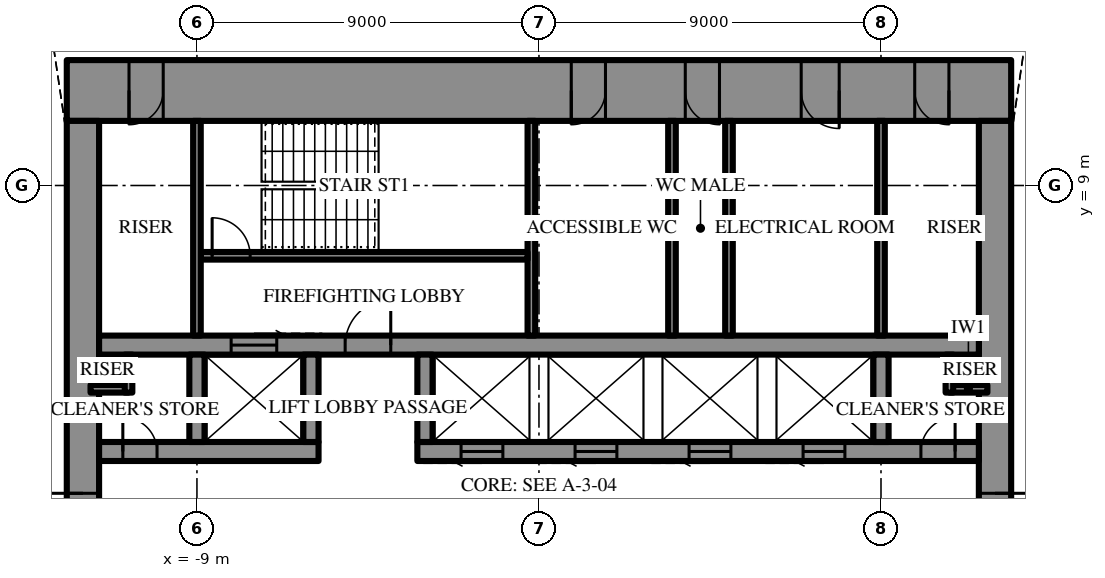
"""IFC4 building model, lengths in metres.
Left out: names, types, materials, properties, quantities, classifications, styles, units other than length and angle.
Written with IfcOpenShell. Run it as: python <this file> out.ifc"""

import sys

from ifc_helpers import new_model, si_unit, direction, frame, frame_2d, origin, place, context, subcontext, project, spatial, rectangle, extrude, element, fill, save


model = new_model("IFC4")
c1 = context("Model", 3, precision=1e-05, world=origin(), true_north=direction((0.0, 1.0)))
c2 = subcontext(c1, "Body", "Model", "MODEL_VIEW")
j1 = project(units=[si_unit("LENGTHUNIT", "METRE"), si_unit("PLANEANGLEUNIT", "RADIAN")], contexts=[c1])
p1 = place(None, origin())
s1 = spatial("IfcSite", under=j1, at=p1, CompositionType="ELEMENT")
p2 = place(p1, origin())
s2 = spatial("IfcBuilding", under=s1, at=p2, CompositionType="ELEMENT")
p3 = place(p2, frame((0.0, 0.0, 328.3)))
s3 = spatial("IfcBuildingStorey", under=s2, at=p3, CompositionType="ELEMENT", Elevation=328.3)
p4 = place(p3, frame((-12.425, 11.5, 0.0), z_axis=(0.0, 0.0, 1.0), x_axis=(1.0, 0.0, 0.0)))
e1 = element("IfcWall", 1, at=p4, inside=s3, PredefinedType="SHEAR", context=c2, shape_type="SweptSolid", body=[
    extrude(rectangle(XDim=24.85, YDim=1.6, at=frame_2d((12.425, 0.0))), origin(), (0.0, 0.0, 1.0), 4.2),
])
p5 = place(p4, frame((13.275, 0.0, 0.0)))
e2 = element("IfcOpeningElement", 2, at=p5, cuts=e1, PredefinedType="OPENING", context=c2, shape_type="SweptSolid", body=[
    extrude(rectangle(XDim=0.9, YDim=2.2, at=frame_2d((0.45, 1.1))), frame((0.0, 0.81, 0.0), z_axis=(0.0, -1.0, 0.0), x_axis=(1.0, 0.0, 0.0)), (0.0, 0.0, 1.0), 1.62),
])
p6 = place(p4, frame((16.275, 0.0, 0.0)))
e3 = element("IfcOpeningElement", 3, at=p6, cuts=e1, PredefinedType="OPENING", context=c2, shape_type="SweptSolid", body=[
    extrude(rectangle(XDim=0.9, YDim=2.2, at=frame_2d((0.45, 1.1))), frame((0.0, 0.81, 0.0), z_axis=(0.0, -1.0, 0.0), x_axis=(1.0, 0.0, 0.0)), (0.0, 0.0, 1.0), 1.62),
])
p7 = place(p4, frame((19.325, 0.0, 0.0)))
e4 = element("IfcOpeningElement", 4, at=p7, cuts=e1, PredefinedType="OPENING", context=c2, shape_type="SweptSolid", body=[
    extrude(rectangle(XDim=1.0, YDim=2.2, at=frame_2d((0.5, 1.1))), frame((0.0, 0.81, 0.0), z_axis=(0.0, -1.0, 0.0), x_axis=(1.0, 0.0, 0.0)), (0.0, 0.0, 1.0), 1.62),
])
p8 = place(p4, frame((1.637, 0.0, 0.0)))
e5 = element("IfcOpeningElement", 5, at=p8, cuts=e1, PredefinedType="OPENING", context=c2, shape_type="SweptSolid", body=[
    extrude(rectangle(XDim=0.9, YDim=2.2, at=frame_2d((0.45, 1.1))), frame((0.0, 0.81, 0.0), z_axis=(0.0, -1.0, 0.0), x_axis=(1.0, 0.0, 0.0)), (0.0, 0.0, 1.0), 1.62),
])
p9 = place(p4, frame((22.312, 0.0, 0.0)))
e6 = element("IfcOpeningElement", 6, at=p9, cuts=e1, PredefinedType="OPENING", context=c2, shape_type="SweptSolid", body=[
    extrude(rectangle(XDim=0.9, YDim=2.2, at=frame_2d((0.45, 1.1))), frame((0.0, 0.81, 0.0), z_axis=(0.0, -1.0, 0.0), x_axis=(1.0, 0.0, 0.0)), (0.0, 0.0, 1.0), 1.62),
])
p10 = place(p3, frame((12.0, -10.7, 0.0), z_axis=(0.0, 0.0, 1.0), x_axis=(0.0, 1.0, 0.0)))
e7 = element("IfcWall", 7, at=p10, inside=s3, PredefinedType="SHEAR", context=c2, shape_type="SweptSolid", body=[
    extrude(rectangle(XDim=21.4, YDim=0.85, at=frame_2d((10.7, 0.0))), origin(), (0.0, 0.0, 1.0), 4.2),
])
p11 = place(p10, frame((9.8, 0.0, 0.0)))
e8 = element("IfcOpeningElement", 8, at=p11, cuts=e7, PredefinedType="OPENING", context=c2, shape_type="SweptSolid", body=[
    extrude(rectangle(XDim=1.8, YDim=2.4, at=frame_2d((0.9, 1.2))), frame((0.0, 0.435, 0.0), z_axis=(0.0, -1.0, 0.0), x_axis=(1.0, 0.0, 0.0)), (0.0, 0.0, 1.0), 0.87),
])
p12 = place(p3, frame((-12.0, 10.7, 0.0), z_axis=(0.0, 0.0, 1.0), x_axis=(0.0, -1.0, 0.0)))
e9 = element("IfcWall", 9, at=p12, inside=s3, PredefinedType="SHEAR", context=c2, shape_type="SweptSolid", body=[
    extrude(rectangle(XDim=21.4, YDim=0.85, at=frame_2d((10.7, 0.0))), origin(), (0.0, 0.0, 1.0), 4.2),
])
p13 = place(p12, frame((9.8, 0.0, 0.0)))
e10 = element("IfcOpeningElement", 10, at=p13, cuts=e9, PredefinedType="OPENING", context=c2, shape_type="SweptSolid", body=[
    extrude(rectangle(XDim=1.8, YDim=2.4, at=frame_2d((0.9, 1.2))), frame((0.0, 0.435, 0.0), z_axis=(0.0, -1.0, 0.0), x_axis=(1.0, 0.0, 0.0)), (0.0, 0.0, 1.0), 0.87),
])
p14 = place(p3, frame((-11.575, 2.0, 0.0), z_axis=(0.0, 0.0, 1.0), x_axis=(1.0, 0.0, 0.0)))
e11 = element("IfcWall", 11, at=p14, inside=s3, PredefinedType="SHEAR", context=c2, shape_type="SweptSolid", body=[
    extrude(rectangle(XDim=5.775, YDim=0.5, at=frame_2d((2.887, 0.0))), origin(), (0.0, 0.0, 1.0), 4.2),
])
p15 = place(p14, frame((0.625, 0.0, 0.0)))
e12 = element("IfcOpeningElement", 12, at=p15, cuts=e11, PredefinedType="OPENING", context=c2, shape_type="SweptSolid", body=[
    extrude(rectangle(XDim=0.9, YDim=2.2, at=frame_2d((0.45, 1.1))), frame((0.0, 0.26, 0.0), z_axis=(0.0, -1.0, 0.0), x_axis=(1.0, 0.0, 0.0)), (0.0, 0.0, 1.0), 0.52),
])
p16 = place(p3, frame((-3.2, 2.0, 0.0), z_axis=(0.0, 0.0, 1.0), x_axis=(1.0, 0.0, 0.0)))
e13 = element("IfcWall", 13, at=p16, inside=s3, PredefinedType="SHEAR", context=c2, shape_type="SweptSolid", body=[
    extrude(rectangle(XDim=14.775, YDim=0.5, at=frame_2d((7.387, 0.0))), origin(), (0.0, 0.0, 1.0), 4.2),
])
p17 = place(p16, frame((13.25, 0.0, 0.0)))
e14 = element("IfcOpeningElement", 14, at=p17, cuts=e13, PredefinedType="OPENING", context=c2, shape_type="SweptSolid", body=[
    extrude(rectangle(XDim=0.9, YDim=2.2, at=frame_2d((0.45, 1.1))), frame((0.0, 0.26, 0.0), z_axis=(0.0, -1.0, 0.0), x_axis=(1.0, 0.0, 0.0)), (0.0, 0.0, 1.0), 0.52),
])
p18 = place(p16, frame((1.15, 0.0, 0.0)))
e15 = element("IfcOpeningElement", 15, at=p18, cuts=e13, PredefinedType="OPENING", context=c2, shape_type="SweptSolid", body=[
    extrude(rectangle(XDim=1.1, YDim=2.2, at=frame_2d((0.55, 1.1))), frame((0.0, 0.26, 0.0), z_axis=(0.0, -1.0, 0.0), x_axis=(1.0, 0.0, 0.0)), (0.0, 0.0, 1.0), 0.52),
])
p19 = place(p16, frame((4.15, 0.0, 0.0)))
e16 = element("IfcOpeningElement", 16, at=p19, cuts=e13, PredefinedType="OPENING", context=c2, shape_type="SweptSolid", body=[
    extrude(rectangle(XDim=1.1, YDim=2.2, at=frame_2d((0.55, 1.1))), frame((0.0, 0.26, 0.0), z_axis=(0.0, -1.0, 0.0), x_axis=(1.0, 0.0, 0.0)), (0.0, 0.0, 1.0), 0.52),
])
p20 = place(p16, frame((7.15, 0.0, 0.0)))
e17 = element("IfcOpeningElement", 17, at=p20, cuts=e13, PredefinedType="OPENING", context=c2, shape_type="SweptSolid", body=[
    extrude(rectangle(XDim=1.1, YDim=2.2, at=frame_2d((0.55, 1.1))), frame((0.0, 0.26, 0.0), z_axis=(0.0, -1.0, 0.0), x_axis=(1.0, 0.0, 0.0)), (0.0, 0.0, 1.0), 0.52),
])
p21 = place(p16, frame((10.15, 0.0, 0.0)))
e18 = element("IfcOpeningElement", 18, at=p21, cuts=e13, PredefinedType="OPENING", context=c2, shape_type="SweptSolid", body=[
    extrude(rectangle(XDim=1.1, YDim=2.2, at=frame_2d((0.55, 1.1))), frame((0.0, 0.26, 0.0), z_axis=(0.0, -1.0, 0.0), x_axis=(1.0, 0.0, 0.0)), (0.0, 0.0, 1.0), 0.52),
])
p22 = place(p3, frame((-11.575, 4.8, 0.0), z_axis=(0.0, 0.0, 1.0), x_axis=(1.0, 0.0, 0.0)))
e19 = element("IfcWall", 19, at=p22, inside=s3, PredefinedType="SHEAR", context=c2, shape_type="SweptSolid", body=[
    extrude(rectangle(XDim=23.15, YDim=0.5, at=frame_2d((11.575, 0.0))), origin(), (0.0, 0.0, 1.0), 4.2),
])
p23 = place(p22, frame((6.475, 0.0, 0.0)))
e20 = element("IfcOpeningElement", 20, at=p23, cuts=e19, PredefinedType="OPENING", context=c2, shape_type="SweptSolid", body=[
    extrude(rectangle(XDim=1.2, YDim=2.2, at=frame_2d((0.6, 1.1))), frame((0.0, 0.26, 0.0), z_axis=(0.0, -1.0, 0.0), x_axis=(1.0, 0.0, 0.0)), (0.0, 0.0, 1.0), 0.52),
])
p24 = place(p22, frame((3.475, 0.0, 0.0)))
e21 = element("IfcOpeningElement", 21, at=p24, cuts=e19, PredefinedType="OPENING", context=c2, shape_type="SweptSolid", body=[
    extrude(rectangle(XDim=1.2, YDim=2.2, at=frame_2d((0.6, 1.1))), frame((0.0, 0.26, 0.0), z_axis=(0.0, -1.0, 0.0), x_axis=(1.0, 0.0, 0.0)), (0.0, 0.0, 1.0), 0.52),
])
for number, where, z_axis, x_axis in (
    (22, (-9.0, 2.25, 0.0), (0.0, 0.0, 1.0), (0.0, 1.0, 0.0)),
    (23, (-6.0, 2.25, 0.0), (0.0, 0.0, 1.0), (0.0, 1.0, 0.0)),
    (24, (-3.0, 2.25, 0.0), (0.0, 0.0, 1.0), (0.0, 1.0, 0.0)),
    (25, (9.0, 2.25, 0.0), (0.0, 0.0, 1.0), (0.0, 1.0, 0.0)),
):
    element("IfcWall", number, at=place(p3, frame(where, z_axis=z_axis, x_axis=x_axis)), inside=s3, PredefinedType="SHEAR", context=c2, shape_type="SweptSolid", body=[
        extrude(rectangle(XDim=2.3, YDim=0.4, at=frame_2d((1.15, 0.0))), origin(), (0.0, 0.0, 1.0), 4.2),
    ])
p25 = place(p3, frame((-0.2, 5.05, 0.0), z_axis=(0.0, 0.0, 1.0), x_axis=(0.0, 1.0, 0.0)))
e26 = element("IfcWall", 26, at=p25, inside=s3, PredefinedType="SHEAR", context=c2, shape_type="SweptSolid", body=[
    extrude(rectangle(XDim=5.65, YDim=0.2, at=frame_2d((2.825, 0.0))), origin(), (0.0, 0.0, 1.0), 4.2),
])
p26 = place(p3, frame((-8.9, 7.15, 0.0), z_axis=(0.0, 0.0, 1.0), x_axis=(1.0, 0.0, 0.0)))
e27 = element("IfcWall", 27, at=p26, inside=s3, PredefinedType="SHEAR", context=c2, shape_type="SweptSolid", body=[
    extrude(rectangle(XDim=8.6, YDim=0.2, at=frame_2d((4.3, 0.0))), origin(), (0.0, 0.0, 1.0), 4.2),
])
p27 = place(p26, frame((0.3, 0.0, 0.0)))
e28 = element("IfcOpeningElement", 28, at=p27, cuts=e27, PredefinedType="OPENING", context=c2, shape_type="SweptSolid", body=[
    extrude(rectangle(XDim=1.0, YDim=2.2, at=frame_2d((0.5, 1.1))), frame((0.0, 0.11, 0.0), z_axis=(0.0, -1.0, 0.0), x_axis=(1.0, 0.0, 0.0)), (0.0, 0.0, 1.0), 0.22),
])
for number, where, z_axis, x_axis in (
    (29, (-9.0, 5.05, 0.0), (0.0, 0.0, 1.0), (0.0, 1.0, 0.0)),
    (30, (9.0, 5.05, 0.0), (0.0, 0.0, 1.0), (0.0, 1.0, 0.0)),
    (31, (3.5, 5.05, 0.0), (0.0, 0.0, 1.0), (0.0, 1.0, 0.0)),
    (32, (5.0, 5.05, 0.0), (0.0, 0.0, 1.0), (0.0, 1.0, 0.0)),
):
    element("IfcWall", number, at=place(p3, frame(where, z_axis=z_axis, x_axis=x_axis)), inside=s3, PredefinedType="PARTITIONING", context=c2, shape_type="SweptSolid", body=[
        extrude(rectangle(XDim=5.65, YDim=0.2, at=frame_2d((2.825, 0.0))), origin(), (0.0, 0.0, 1.0), 4.0),
    ])
for number, where, z_axis, x_axis in (
    (33, (-11.8, 3.65, 0.0), (0.0, 0.0, 1.0), (1.0, 0.0, 0.0)),
    (34, (-10.8, 3.55, 0.0), (0.0, 0.0, 1.0), (0.0, 1.0, 0.0)),
    (35, (10.8, 3.65, 0.0), (0.0, 0.0, 1.0), (1.0, 0.0, 0.0)),
    (36, (10.8, 3.55, 0.0), (0.0, 0.0, 1.0), (0.0, 1.0, 0.0)),
):
    element("IfcWall", number, at=place(p3, frame(where, z_axis=z_axis, x_axis=x_axis)), inside=s3, PredefinedType="PARTITIONING", context=c2, shape_type="SweptSolid", body=[
        extrude(rectangle(XDim=1.0, YDim=0.2, at=frame_2d((0.5, 0.0))), origin(), (0.0, 0.0, 1.0), 4.0),
    ])
p28 = place(p11, frame((1.8, 0.0, 0.0), z_axis=(0.0, 0.0, 1.0), x_axis=(-1.0, 0.0, 0.0)))
e37 = element("IfcDoor", 37, at=p28, inside=s3, OperationType="DOUBLE_DOOR_SINGLE_SWING", PredefinedType="DOOR", context=c2, shape_type="SweptSolid", body=[
    extrude(rectangle(XDim=1.8, YDim=2.4, at=frame_2d((0.9, 1.2))), frame((0.0, 0.025, 0.0), z_axis=(0.0, -1.0, 0.0), x_axis=(1.0, 0.0, 0.0)), (0.0, 0.0, 1.0), 0.05),
])
fill(e8, e37)
p29 = place(p13, frame((1.8, 0.0, 0.0), z_axis=(0.0, 0.0, 1.0), x_axis=(-1.0, 0.0, 0.0)))
e38 = element("IfcDoor", 38, at=p29, inside=s3, OperationType="DOUBLE_DOOR_SINGLE_SWING", PredefinedType="DOOR", context=c2, shape_type="SweptSolid", body=[
    extrude(rectangle(XDim=1.8, YDim=2.4, at=frame_2d((0.9, 1.2))), frame((0.0, 0.025, 0.0), z_axis=(0.0, -1.0, 0.0), x_axis=(1.0, 0.0, 0.0)), (0.0, 0.0, 1.0), 0.05),
])
fill(e10, e38)
p30 = place(p23, origin())
e39 = element("IfcDoor", 39, at=p30, inside=s3, OperationType="SINGLE_SWING_LEFT", PredefinedType="DOOR", context=c2, shape_type="SweptSolid", body=[
    extrude(rectangle(XDim=1.2, YDim=2.2, at=frame_2d((0.6, 1.1))), frame((0.0, 0.025, 0.0), z_axis=(0.0, -1.0, 0.0), x_axis=(1.0, 0.0, 0.0)), (0.0, 0.0, 1.0), 0.05),
])
fill(e20, e39)
p31 = place(p27, origin())
e40 = element("IfcDoor", 40, at=p31, inside=s3, OperationType="SINGLE_SWING_RIGHT", PredefinedType="DOOR", context=c2, shape_type="SweptSolid", body=[
    extrude(rectangle(XDim=1.0, YDim=2.2, at=frame_2d((0.5, 1.1))), frame((0.0, 0.025, 0.0), z_axis=(0.0, -1.0, 0.0), x_axis=(1.0, 0.0, 0.0)), (0.0, 0.0, 1.0), 0.05),
])
fill(e28, e40)
p32 = place(p5, frame((0.9, 0.0, 0.0), z_axis=(0.0, 0.0, 1.0), x_axis=(-1.0, 0.0, 0.0)))
e41 = element("IfcDoor", 41, at=p32, inside=s3, OperationType="SINGLE_SWING_LEFT", PredefinedType="DOOR", context=c2, shape_type="SweptSolid", body=[
    extrude(rectangle(XDim=0.9, YDim=2.2, at=frame_2d((0.45, 1.1))), frame((0.0, 0.025, 0.0), z_axis=(0.0, -1.0, 0.0), x_axis=(1.0, 0.0, 0.0)), (0.0, 0.0, 1.0), 0.05),
])
fill(e2, e41)
p33 = place(p6, frame((0.9, 0.0, 0.0), z_axis=(0.0, 0.0, 1.0), x_axis=(-1.0, 0.0, 0.0)))
e42 = element("IfcDoor", 42, at=p33, inside=s3, OperationType="SINGLE_SWING_RIGHT", PredefinedType="DOOR", context=c2, shape_type="SweptSolid", body=[
    extrude(rectangle(XDim=0.9, YDim=2.2, at=frame_2d((0.45, 1.1))), frame((0.0, 0.025, 0.0), z_axis=(0.0, -1.0, 0.0), x_axis=(1.0, 0.0, 0.0)), (0.0, 0.0, 1.0), 0.05),
])
fill(e3, e42)
p34 = place(p7, frame((1.0, 0.0, 0.0), z_axis=(0.0, 0.0, 1.0), x_axis=(-1.0, 0.0, 0.0)))
e43 = element("IfcDoor", 43, at=p34, inside=s3, OperationType="SINGLE_SWING_RIGHT", PredefinedType="DOOR", context=c2, shape_type="SweptSolid", body=[
    extrude(rectangle(XDim=1.0, YDim=2.2, at=frame_2d((0.5, 1.1))), frame((0.0, 0.025, 0.0), z_axis=(0.0, -1.0, 0.0), x_axis=(1.0, 0.0, 0.0)), (0.0, 0.0, 1.0), 0.05),
])
fill(e4, e43)
p35 = place(p8, frame((0.9, 0.0, 0.0), z_axis=(0.0, 0.0, 1.0), x_axis=(-1.0, 0.0, 0.0)))
e44 = element("IfcDoor", 44, at=p35, inside=s3, OperationType="SINGLE_SWING_LEFT", PredefinedType="DOOR", context=c2, shape_type="SweptSolid", body=[
    extrude(rectangle(XDim=0.9, YDim=2.2, at=frame_2d((0.45, 1.1))), frame((0.0, 0.025, 0.0), z_axis=(0.0, -1.0, 0.0), x_axis=(1.0, 0.0, 0.0)), (0.0, 0.0, 1.0), 0.05),
])
fill(e5, e44)
p36 = place(p9, frame((0.9, 0.0, 0.0), z_axis=(0.0, 0.0, 1.0), x_axis=(-1.0, 0.0, 0.0)))
e45 = element("IfcDoor", 45, at=p36, inside=s3, OperationType="SINGLE_SWING_RIGHT", PredefinedType="DOOR", context=c2, shape_type="SweptSolid", body=[
    extrude(rectangle(XDim=0.9, YDim=2.2, at=frame_2d((0.45, 1.1))), frame((0.0, 0.025, 0.0), z_axis=(0.0, -1.0, 0.0), x_axis=(1.0, 0.0, 0.0)), (0.0, 0.0, 1.0), 0.05),
])
fill(e6, e45)
p37 = place(p15, origin())
e46 = element("IfcDoor", 46, at=p37, inside=s3, OperationType="SINGLE_SWING_RIGHT", PredefinedType="DOOR", context=c2, shape_type="SweptSolid", body=[
    extrude(rectangle(XDim=0.9, YDim=2.2, at=frame_2d((0.45, 1.1))), frame((0.0, 0.025, 0.0), z_axis=(0.0, -1.0, 0.0), x_axis=(1.0, 0.0, 0.0)), (0.0, 0.0, 1.0), 0.05),
])
fill(e12, e46)
p38 = place(p17, origin())
e47 = element("IfcDoor", 47, at=p38, inside=s3, OperationType="SINGLE_SWING_LEFT", PredefinedType="DOOR", context=c2, shape_type="SweptSolid", body=[
    extrude(rectangle(XDim=0.9, YDim=2.2, at=frame_2d((0.45, 1.1))), frame((0.0, 0.025, 0.0), z_axis=(0.0, -1.0, 0.0), x_axis=(1.0, 0.0, 0.0)), (0.0, 0.0, 1.0), 0.05),
])
fill(e14, e47)
p39 = place(p24, origin())
e48 = element("IfcDoor", 48, at=p39, inside=s3, OperationType="SLIDING_TO_LEFT", PredefinedType="DOOR", context=c2, shape_type="SweptSolid", body=[
    extrude(rectangle(XDim=1.2, YDim=2.2, at=frame_2d((0.6, 1.1))), frame((0.0, 0.025, 0.0), z_axis=(0.0, -1.0, 0.0), x_axis=(1.0, 0.0, 0.0)), (0.0, 0.0, 1.0), 0.05),
])
fill(e21, e48)
p40 = place(p18, frame((1.1, 0.0, 0.0), z_axis=(0.0, 0.0, 1.0), x_axis=(-1.0, 0.0, 0.0)))
e49 = element("IfcDoor", 49, at=p40, inside=s3, OperationType="SLIDING_TO_LEFT", PredefinedType="DOOR", context=c2, shape_type="SweptSolid", body=[
    extrude(rectangle(XDim=1.1, YDim=2.2, at=frame_2d((0.55, 1.1))), frame((0.0, 0.025, 0.0), z_axis=(0.0, -1.0, 0.0), x_axis=(1.0, 0.0, 0.0)), (0.0, 0.0, 1.0), 0.05),
])
fill(e15, e49)
p41 = place(p19, frame((1.1, 0.0, 0.0), z_axis=(0.0, 0.0, 1.0), x_axis=(-1.0, 0.0, 0.0)))
e50 = element("IfcDoor", 50, at=p41, inside=s3, OperationType="SLIDING_TO_LEFT", PredefinedType="DOOR", context=c2, shape_type="SweptSolid", body=[
    extrude(rectangle(XDim=1.1, YDim=2.2, at=frame_2d((0.55, 1.1))), frame((0.0, 0.025, 0.0), z_axis=(0.0, -1.0, 0.0), x_axis=(1.0, 0.0, 0.0)), (0.0, 0.0, 1.0), 0.05),
])
fill(e16, e50)
p42 = place(p20, frame((1.1, 0.0, 0.0), z_axis=(0.0, 0.0, 1.0), x_axis=(-1.0, 0.0, 0.0)))
e51 = element("IfcDoor", 51, at=p42, inside=s3, OperationType="SLIDING_TO_LEFT", PredefinedType="DOOR", context=c2, shape_type="SweptSolid", body=[
    extrude(rectangle(XDim=1.1, YDim=2.2, at=frame_2d((0.55, 1.1))), frame((0.0, 0.025, 0.0), z_axis=(0.0, -1.0, 0.0), x_axis=(1.0, 0.0, 0.0)), (0.0, 0.0, 1.0), 0.05),
])
fill(e17, e51)
p43 = place(p21, frame((1.1, 0.0, 0.0), z_axis=(0.0, 0.0, 1.0), x_axis=(-1.0, 0.0, 0.0)))
e52 = element("IfcDoor", 52, at=p43, inside=s3, OperationType="SLIDING_TO_LEFT", PredefinedType="DOOR", context=c2, shape_type="SweptSolid", body=[
    extrude(rectangle(XDim=1.1, YDim=2.2, at=frame_2d((0.55, 1.1))), frame((0.0, 0.025, 0.0), z_axis=(0.0, -1.0, 0.0), x_axis=(1.0, 0.0, 0.0)), (0.0, 0.0, 1.0), 0.05),
])
fill(e18, e52)
save(model, sys.argv[1])
